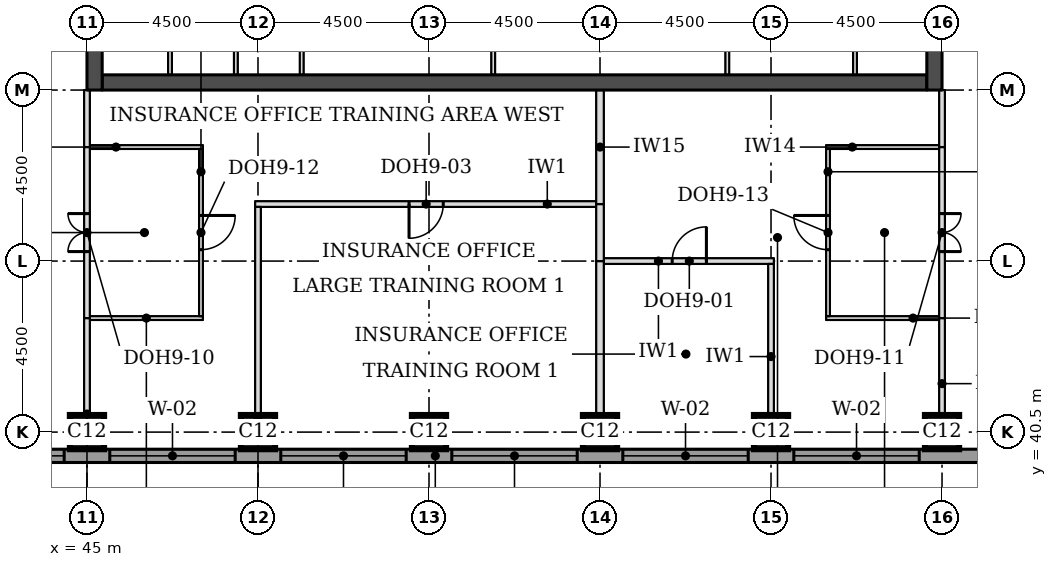
"""IFC4 building model, lengths in metres.
Left out: names, types, materials, properties, quantities, classifications, styles, units other than length and angle.
Written with IfcOpenShell. Run it as: python <this file> out.ifc"""

import sys

from ifc_helpers import new_model, si_unit, direction, frame, frame_2d, origin, origin_2d, place, context, subcontext, project, spatial, rectangle, extrude, element, fill, save


model = new_model("IFC4")
c1 = context("Model", 3, precision=1e-05, world=origin(), true_north=direction((0.0, 1.0)))
c2 = subcontext(c1, "Body", "Model", "MODEL_VIEW")
j1 = project(units=[si_unit("LENGTHUNIT", "METRE"), si_unit("PLANEANGLEUNIT", "RADIAN")], contexts=[c1])
p1 = place(None, origin())
s1 = spatial("IfcSite", under=j1, at=p1, CompositionType="ELEMENT")
p2 = place(p1, origin())
s2 = spatial("IfcBuilding", under=s1, at=p2, CompositionType="ELEMENT")
p3 = place(p2, frame((0.0, 0.0, 219.3)))
s3 = spatial("IfcBuildingStorey", under=s2, at=p3, CompositionType="ELEMENT", Elevation=219.3)
for number, where, z_axis, x_axis in (
    (1, (45.0, 40.5, 0.0), (0.0, 0.0, 1.0), (1.0, 0.0, 0.0)),
    (2, (49.5, 40.5, 0.0), (0.0, 0.0, 1.0), (1.0, 0.0, 0.0)),
    (3, (54.0, 40.5, 0.0), (0.0, 0.0, 1.0), (1.0, 0.0, 0.0)),
    (4, (58.5, 40.5, 0.0), (0.0, 0.0, 1.0), (1.0, 0.0, 0.0)),
    (5, (63.0, 40.5, 0.0), (0.0, 0.0, 1.0), (1.0, 0.0, 0.0)),
    (6, (67.5, 40.5, 0.0), (0.0, 0.0, 1.0), (1.0, 0.0, 0.0)),
):
    element("IfcColumn", number, at=place(p3, frame(where, z_axis=z_axis, x_axis=x_axis)), inside=s3, PredefinedType="COLUMN", context=c2, shape_type="SweptSolid", body=[
        extrude(rectangle(XDim=0.9, YDim=0.9, at=origin_2d()), origin(), (0.0, 0.0, 1.0), 3.7),
    ])
p4 = place(p3, frame((45.4, 49.7, 0.0), z_axis=(0.0, 0.0, 1.0), x_axis=(1.0, 0.0, 0.0)))
e7 = element("IfcWall", 7, at=p4, inside=s3, PredefinedType="SHEAR", context=c2, shape_type="SweptSolid", body=[
    extrude(rectangle(XDim=21.7, YDim=0.4, at=frame_2d((10.85, 0.0))), origin(), (0.0, 0.0, 1.0), 3.7),
])
p5 = place(p3, frame((45.2, 49.5, 0.0), z_axis=(0.0, 0.0, 1.0), x_axis=(0.0, 1.0, 0.0)))
e8 = element("IfcWall", 8, at=p5, inside=s3, PredefinedType="SHEAR", context=c2, shape_type="SweptSolid", body=[
    extrude(rectangle(XDim=22.5, YDim=0.4, at=frame_2d((11.25, 0.0))), origin(), (0.0, 0.0, 1.0), 3.7),
])
p6 = place(p5, frame((4.2, 0.0, 0.0)))
e9 = element("IfcOpeningElement", 9, at=p6, cuts=e8, PredefinedType="OPENING", context=c2, shape_type="SweptSolid", body=[
    extrude(rectangle(XDim=1.8, YDim=2.1, at=frame_2d((0.9, 1.05))), frame((0.0, 0.21, 0.0), z_axis=(0.0, -1.0, 0.0), x_axis=(1.0, 0.0, 0.0)), (0.0, 0.0, 1.0), 0.42),
])
p7 = place(p5, frame((6.9, 0.0, 0.0)))
e10 = element("IfcOpeningElement", 10, at=p7, cuts=e8, PredefinedType="OPENING", context=c2, shape_type="SweptSolid", body=[
    extrude(rectangle(XDim=1.1, YDim=2.1, at=frame_2d((0.55, 1.05))), frame((0.0, 0.21, 0.0), z_axis=(0.0, -1.0, 0.0), x_axis=(1.0, 0.0, 0.0)), (0.0, 0.0, 1.0), 0.42),
])
p8 = place(p5, frame((13.6, 0.0, 0.0)))
e11 = element("IfcOpeningElement", 11, at=p8, cuts=e8, PredefinedType="OPENING", context=c2, shape_type="SweptSolid", body=[
    extrude(rectangle(XDim=1.1, YDim=2.1, at=frame_2d((0.55, 1.05))), frame((0.0, 0.21, 0.0), z_axis=(0.0, -1.0, 0.0), x_axis=(1.0, 0.0, 0.0)), (0.0, 0.0, 1.0), 0.42),
])
p9 = place(p5, frame((16.5, 0.0, 0.0)))
e12 = element("IfcOpeningElement", 12, at=p9, cuts=e8, PredefinedType="OPENING", context=c2, shape_type="SweptSolid", body=[
    extrude(rectangle(XDim=1.8, YDim=2.1, at=frame_2d((0.9, 1.05))), frame((0.0, 0.21, 0.0), z_axis=(0.0, -1.0, 0.0), x_axis=(1.0, 0.0, 0.0)), (0.0, 0.0, 1.0), 0.42),
])
p10 = place(p3, frame((67.3, 49.5, 0.0), z_axis=(0.0, 0.0, 1.0), x_axis=(0.0, 1.0, 0.0)))
e13 = element("IfcWall", 13, at=p10, inside=s3, PredefinedType="SHEAR", context=c2, shape_type="SweptSolid", body=[
    extrude(rectangle(XDim=22.5, YDim=0.4, at=frame_2d((11.25, 0.0))), origin(), (0.0, 0.0, 1.0), 3.7),
])
p11 = place(p10, frame((4.2, 0.0, 0.0)))
e14 = element("IfcOpeningElement", 14, at=p11, cuts=e13, PredefinedType="OPENING", context=c2, shape_type="SweptSolid", body=[
    extrude(rectangle(XDim=1.8, YDim=2.1, at=frame_2d((0.9, 1.05))), frame((0.0, 0.21, 0.0), z_axis=(0.0, -1.0, 0.0), x_axis=(1.0, 0.0, 0.0)), (0.0, 0.0, 1.0), 0.42),
])
p12 = place(p10, frame((6.9, 0.0, 0.0)))
e15 = element("IfcOpeningElement", 15, at=p12, cuts=e13, PredefinedType="OPENING", context=c2, shape_type="SweptSolid", body=[
    extrude(rectangle(XDim=1.1, YDim=2.1, at=frame_2d((0.55, 1.05))), frame((0.0, 0.21, 0.0), z_axis=(0.0, -1.0, 0.0), x_axis=(1.0, 0.0, 0.0)), (0.0, 0.0, 1.0), 0.42),
])
p13 = place(p10, frame((13.6, 0.0, 0.0)))
e16 = element("IfcOpeningElement", 16, at=p13, cuts=e13, PredefinedType="OPENING", context=c2, shape_type="SweptSolid", body=[
    extrude(rectangle(XDim=1.1, YDim=2.1, at=frame_2d((0.55, 1.05))), frame((0.0, 0.21, 0.0), z_axis=(0.0, -1.0, 0.0), x_axis=(1.0, 0.0, 0.0)), (0.0, 0.0, 1.0), 0.42),
])
p14 = place(p10, frame((16.5, 0.0, 0.0)))
e17 = element("IfcOpeningElement", 17, at=p14, cuts=e13, PredefinedType="OPENING", context=c2, shape_type="SweptSolid", body=[
    extrude(rectangle(XDim=1.8, YDim=2.1, at=frame_2d((0.9, 1.05))), frame((0.0, 0.21, 0.0), z_axis=(0.0, -1.0, 0.0), x_axis=(1.0, 0.0, 0.0)), (0.0, 0.0, 1.0), 0.42),
])
p15 = place(p3, frame((36.0, 39.875, 0.0), z_axis=(0.0, 0.0, 1.0), x_axis=(1.0, 0.0, 0.0)))
e18 = element("IfcWall", 18, at=p15, inside=s3, PredefinedType="STANDARD", context=c2, shape_type="SweptSolid", body=[
    extrude(rectangle(XDim=36.331, YDim=0.35, at=frame_2d((18.166, 0.0))), origin(), (0.0, 0.0, 1.0), 3.525),
])
p16 = place(p15, frame((5.1, 0.0, 0.9)))
e19 = element("IfcOpeningElement", 19, at=p16, cuts=e18, PredefinedType="OPENING", context=c2, shape_type="SweptSolid", body=[
    extrude(rectangle(XDim=3.3, YDim=1.9, at=frame_2d((1.65, 0.95))), frame((0.0, 0.185, 0.0), z_axis=(0.0, -1.0, 0.0), x_axis=(1.0, 0.0, 0.0)), (0.0, 0.0, 1.0), 0.37),
])
p17 = place(p15, frame((9.6, 0.0, 0.9)))
e20 = element("IfcOpeningElement", 20, at=p17, cuts=e18, PredefinedType="OPENING", context=c2, shape_type="SweptSolid", body=[
    extrude(rectangle(XDim=3.3, YDim=1.9, at=frame_2d((1.65, 0.95))), frame((0.0, 0.185, 0.0), z_axis=(0.0, -1.0, 0.0), x_axis=(1.0, 0.0, 0.0)), (0.0, 0.0, 1.0), 0.37),
])
p18 = place(p15, frame((14.1, 0.0, 0.9)))
e21 = element("IfcOpeningElement", 21, at=p18, cuts=e18, PredefinedType="OPENING", context=c2, shape_type="SweptSolid", body=[
    extrude(rectangle(XDim=3.3, YDim=1.9, at=frame_2d((1.65, 0.95))), frame((0.0, 0.185, 0.0), z_axis=(0.0, -1.0, 0.0), x_axis=(1.0, 0.0, 0.0)), (0.0, 0.0, 1.0), 0.37),
])
p19 = place(p15, frame((18.6, 0.0, 0.9)))
e22 = element("IfcOpeningElement", 22, at=p19, cuts=e18, PredefinedType="OPENING", context=c2, shape_type="SweptSolid", body=[
    extrude(rectangle(XDim=3.3, YDim=1.9, at=frame_2d((1.65, 0.95))), frame((0.0, 0.185, 0.0), z_axis=(0.0, -1.0, 0.0), x_axis=(1.0, 0.0, 0.0)), (0.0, 0.0, 1.0), 0.37),
])
p20 = place(p15, frame((23.1, 0.0, 0.9)))
e23 = element("IfcOpeningElement", 23, at=p20, cuts=e18, PredefinedType="OPENING", context=c2, shape_type="SweptSolid", body=[
    extrude(rectangle(XDim=3.3, YDim=1.9, at=frame_2d((1.65, 0.95))), frame((0.0, 0.185, 0.0), z_axis=(0.0, -1.0, 0.0), x_axis=(1.0, 0.0, 0.0)), (0.0, 0.0, 1.0), 0.37),
])
p21 = place(p15, frame((27.6, 0.0, 0.9)))
e24 = element("IfcOpeningElement", 24, at=p21, cuts=e18, PredefinedType="OPENING", context=c2, shape_type="SweptSolid", body=[
    extrude(rectangle(XDim=3.3, YDim=1.9, at=frame_2d((1.65, 0.95))), frame((0.0, 0.185, 0.0), z_axis=(0.0, -1.0, 0.0), x_axis=(1.0, 0.0, 0.0)), (0.0, 0.0, 1.0), 0.37),
])
for number, where, z_axis, x_axis in (
    (25, (45.075, 43.5, 0.0), (0.0, 0.0, 1.0), (1.0, 0.0, 0.0)),
    (26, (64.45, 43.5, 0.0), (0.0, 0.0, 1.0), (1.0, 0.0, 0.0)),
):
    element("IfcWall", number, at=place(p3, frame(where, z_axis=z_axis, x_axis=x_axis)), inside=s3, PredefinedType="PARTITIONING", context=c2, shape_type="SweptSolid", body=[
        extrude(rectangle(XDim=2.975, YDim=0.1, at=frame_2d((1.488, 0.0))), origin(), (0.0, 0.0, 1.0), 3.55),
    ])
p22 = place(p3, frame((58.6, 45.0, 0.0), z_axis=(0.0, 0.0, 1.0), x_axis=(1.0, 0.0, 0.0)))
e27 = element("IfcWall", 27, at=p22, inside=s3, PredefinedType="PARTITIONING", context=c2, shape_type="SweptSolid", body=[
    extrude(rectangle(XDim=4.475, YDim=0.15, at=frame_2d((2.237, 0.0))), origin(), (0.0, 0.0, 1.0), 3.55),
])
p23 = place(p22, frame((1.8, 0.0, 0.0)))
e28 = element("IfcOpeningElement", 28, at=p23, cuts=e27, PredefinedType="OPENING", context=c2, shape_type="SweptSolid", body=[
    extrude(rectangle(XDim=0.9, YDim=2.1, at=frame_2d((0.45, 1.05))), frame((0.0, 0.085, 0.0), z_axis=(0.0, -1.0, 0.0), x_axis=(1.0, 0.0, 0.0)), (0.0, 0.0, 1.0), 0.17),
])
p24 = place(p3, frame((49.425, 46.5, 0.0), z_axis=(0.0, 0.0, 1.0), x_axis=(1.0, 0.0, 0.0)))
e29 = element("IfcWall", 29, at=p24, inside=s3, PredefinedType="PARTITIONING", context=c2, shape_type="SweptSolid", body=[
    extrude(rectangle(XDim=8.975, YDim=0.15, at=frame_2d((4.487, 0.0))), origin(), (0.0, 0.0, 1.0), 3.55),
])
p25 = place(p24, frame((4.05, 0.0, 0.0)))
e30 = element("IfcOpeningElement", 30, at=p25, cuts=e29, PredefinedType="OPENING", context=c2, shape_type="SweptSolid", body=[
    extrude(rectangle(XDim=0.9, YDim=2.1, at=frame_2d((0.45, 1.05))), frame((0.0, 0.085, 0.0), z_axis=(0.0, -1.0, 0.0), x_axis=(1.0, 0.0, 0.0)), (0.0, 0.0, 1.0), 0.17),
])
for number, where, z_axis, x_axis in (
    (31, (45.075, 48.0, 0.0), (0.0, 0.0, 1.0), (1.0, 0.0, 0.0)),
    (32, (64.45, 48.0, 0.0), (0.0, 0.0, 1.0), (1.0, 0.0, 0.0)),
):
    element("IfcWall", number, at=place(p3, frame(where, z_axis=z_axis, x_axis=x_axis)), inside=s3, PredefinedType="PARTITIONING", context=c2, shape_type="SweptSolid", body=[
        extrude(rectangle(XDim=2.975, YDim=0.1, at=frame_2d((1.488, 0.0))), origin(), (0.0, 0.0, 1.0), 3.55),
    ])
p26 = place(p3, frame((45.0, 40.05, 0.0), z_axis=(0.0, 0.0, 1.0), x_axis=(0.0, 1.0, 0.0)))
e33 = element("IfcWall", 33, at=p26, inside=s3, PredefinedType="PARTITIONING", context=c2, shape_type="SweptSolid", body=[
    extrude(rectangle(XDim=3.45, YDim=0.15, at=frame_2d((1.725, 0.0))), origin(), (0.0, 0.0, 1.0), 3.022),
])
p27 = place(p3, frame((49.5, 40.05, 0.0), z_axis=(0.0, 0.0, 1.0), x_axis=(0.0, 1.0, 0.0)))
e34 = element("IfcWall", 34, at=p27, inside=s3, PredefinedType="PARTITIONING", context=c2, shape_type="SweptSolid", body=[
    extrude(rectangle(XDim=6.375, YDim=0.15, at=frame_2d((3.188, 0.0))), origin(), (0.0, 0.0, 1.0), 3.55),
])
p28 = place(p3, frame((58.5, 40.05, 0.0), z_axis=(0.0, 0.0, 1.0), x_axis=(0.0, 1.0, 0.0)))
e35 = element("IfcWall", 35, at=p28, inside=s3, PredefinedType="PARTITIONING", context=c2, shape_type="SweptSolid", body=[
    extrude(rectangle(XDim=4.95, YDim=0.2, at=frame_2d((2.475, 0.0))), origin(), (0.0, 0.0, 1.0), 3.55),
])
p29 = place(p3, frame((63.0, 40.05, 0.0), z_axis=(0.0, 0.0, 1.0), x_axis=(0.0, 1.0, 0.0)))
e36 = element("IfcWall", 36, at=p29, inside=s3, PredefinedType="PARTITIONING", context=c2, shape_type="SweptSolid", body=[
    extrude(rectangle(XDim=4.875, YDim=0.15, at=frame_2d((2.438, 0.0))), origin(), (0.0, 0.0, 1.0), 3.55),
])
p30 = place(p3, frame((67.5, 40.05, 0.0), z_axis=(0.0, 0.0, 1.0), x_axis=(0.0, 1.0, 0.0)))
e37 = element("IfcWall", 37, at=p30, inside=s3, PredefinedType="PARTITIONING", context=c2, shape_type="SweptSolid", body=[
    extrude(rectangle(XDim=3.45, YDim=0.15, at=frame_2d((1.725, 0.0))), origin(), (0.0, 0.0, 1.0), 3.022),
])
p31 = place(p3, frame((45.0, 43.5, 0.0), z_axis=(0.0, 0.0, 1.0), x_axis=(0.0, 1.0, 0.0)))
e38 = element("IfcWall", 38, at=p31, inside=s3, PredefinedType="PARTITIONING", context=c2, shape_type="SweptSolid", body=[
    extrude(rectangle(XDim=4.5, YDim=0.15, at=frame_2d((2.25, 0.0))), origin(), (0.0, 0.0, 1.0), 3.022),
])
p32 = place(p31, frame((1.75, 0.0, 0.0)))
e39 = element("IfcOpeningElement", 39, at=p32, cuts=e38, PredefinedType="OPENING", context=c2, shape_type="SweptSolid", body=[
    extrude(rectangle(XDim=1.0, YDim=2.1, at=frame_2d((0.5, 1.05))), frame((0.0, 0.085, 0.0), z_axis=(0.0, -1.0, 0.0), x_axis=(1.0, 0.0, 0.0)), (0.0, 0.0, 1.0), 0.17),
])
p33 = place(p3, frame((67.5, 43.5, 0.0), z_axis=(0.0, 0.0, 1.0), x_axis=(0.0, 1.0, 0.0)))
e40 = element("IfcWall", 40, at=p33, inside=s3, PredefinedType="PARTITIONING", context=c2, shape_type="SweptSolid", body=[
    extrude(rectangle(XDim=4.5, YDim=0.15, at=frame_2d((2.25, 0.0))), origin(), (0.0, 0.0, 1.0), 3.022),
])
p34 = place(p33, frame((1.75, 0.0, 0.0)))
e41 = element("IfcOpeningElement", 41, at=p34, cuts=e40, PredefinedType="OPENING", context=c2, shape_type="SweptSolid", body=[
    extrude(rectangle(XDim=1.0, YDim=2.1, at=frame_2d((0.5, 1.05))), frame((0.0, 0.085, 0.0), z_axis=(0.0, -1.0, 0.0), x_axis=(1.0, 0.0, 0.0)), (0.0, 0.0, 1.0), 0.17),
])
p35 = place(p3, frame((48.0, 43.55, 0.0), z_axis=(0.0, 0.0, 1.0), x_axis=(0.0, 1.0, 0.0)))
e42 = element("IfcWall", 42, at=p35, inside=s3, PredefinedType="PARTITIONING", context=c2, shape_type="SweptSolid", body=[
    extrude(rectangle(XDim=4.4, YDim=0.1, at=frame_2d((2.2, 0.0))), origin(), (0.0, 0.0, 1.0), 3.55),
])
p36 = place(p35, frame((1.75, 0.0, 0.0)))
e43 = element("IfcOpeningElement", 43, at=p36, cuts=e42, PredefinedType="OPENING", context=c2, shape_type="SweptSolid", body=[
    extrude(rectangle(XDim=0.9, YDim=2.1, at=frame_2d((0.45, 1.05))), frame((0.0, 0.06, 0.0), z_axis=(0.0, -1.0, 0.0), x_axis=(1.0, 0.0, 0.0)), (0.0, 0.0, 1.0), 0.12),
])
p37 = place(p3, frame((64.5, 43.55, 0.0), z_axis=(0.0, 0.0, 1.0), x_axis=(0.0, 1.0, 0.0)))
e44 = element("IfcWall", 44, at=p37, inside=s3, PredefinedType="PARTITIONING", context=c2, shape_type="SweptSolid", body=[
    extrude(rectangle(XDim=4.4, YDim=0.1, at=frame_2d((2.2, 0.0))), origin(), (0.0, 0.0, 1.0), 3.55),
])
p38 = place(p37, frame((1.75, 0.0, 0.0)))
e45 = element("IfcOpeningElement", 45, at=p38, cuts=e44, PredefinedType="OPENING", context=c2, shape_type="SweptSolid", body=[
    extrude(rectangle(XDim=0.9, YDim=2.1, at=frame_2d((0.45, 1.05))), frame((0.0, 0.06, 0.0), z_axis=(0.0, -1.0, 0.0), x_axis=(1.0, 0.0, 0.0)), (0.0, 0.0, 1.0), 0.12),
])
p39 = place(p3, frame((58.5, 45.0, 0.0), z_axis=(0.0, 0.0, 1.0), x_axis=(0.0, 1.0, 0.0)))
e46 = element("IfcWall", 46, at=p39, inside=s3, PredefinedType="PARTITIONING", context=c2, shape_type="SweptSolid", body=[
    extrude(rectangle(XDim=1.5, YDim=0.2, at=frame_2d((0.75, 0.0))), origin(), (0.0, 0.0, 1.0), 3.55),
])
p40 = place(p3, frame((58.5, 46.5, 0.0), z_axis=(0.0, 0.0, 1.0), x_axis=(0.0, 1.0, 0.0)))
e47 = element("IfcWall", 47, at=p40, inside=s3, PredefinedType="PARTITIONING", context=c2, shape_type="SweptSolid", body=[
    extrude(rectangle(XDim=3.0, YDim=0.2, at=frame_2d((1.5, 0.0))), origin(), (0.0, 0.0, 1.0), 3.55),
])
for number, where, z_axis, x_axis in (
    (48, (45.0, 48.0, 0.0), (0.0, 0.0, 1.0), (0.0, 1.0, 0.0)),
    (49, (67.5, 48.0, 0.0), (0.0, 0.0, 1.0), (0.0, 1.0, 0.0)),
):
    element("IfcWall", number, at=place(p3, frame(where, z_axis=z_axis, x_axis=x_axis)), inside=s3, PredefinedType="PARTITIONING", context=c2, shape_type="SweptSolid", body=[
        extrude(rectangle(XDim=1.5, YDim=0.15, at=frame_2d((0.75, 0.0))), origin(), (0.0, 0.0, 1.0), 3.022),
    ])
for number, where, z_axis, x_axis in (
    (50, (47.185, 49.9, 0.0), (0.0, 0.0, 1.0), (0.0, 1.0, 0.0)),
    (51, (48.917, 49.9, 0.0), (0.0, 0.0, 1.0), (0.0, 1.0, 0.0)),
    (52, (50.65, 49.9, 0.0), (0.0, 0.0, 1.0), (0.0, 1.0, 0.0)),
    (53, (55.69, 49.9, 0.0), (0.0, 0.0, 1.0), (0.0, 1.0, 0.0)),
    (54, (61.85, 49.9, 0.0), (0.0, 0.0, 1.0), (0.0, 1.0, 0.0)),
    (55, (65.21, 49.9, 0.0), (0.0, 0.0, 1.0), (0.0, 1.0, 0.0)),
):
    element("IfcWall", number, at=place(p3, frame(where, z_axis=z_axis, x_axis=x_axis)), inside=s3, PredefinedType="PARTITIONING", context=c2, shape_type="SweptSolid", body=[
        extrude(rectangle(XDim=3.1, YDim=0.1, at=frame_2d((1.55, 0.0))), origin(), (0.0, 0.0, 1.0), 3.55),
    ])
p41 = place(p16, origin())
e56 = element("IfcWindow", 56, at=p41, inside=s3, PartitioningType="SINGLE_PANEL", PredefinedType="WINDOW", context=c2, shape_type="SweptSolid", body=[
    extrude(rectangle(XDim=3.3, YDim=1.9, at=frame_2d((1.65, 0.95))), frame((0.0, 0.085, 0.0), z_axis=(0.0, -1.0, 0.0), x_axis=(1.0, 0.0, 0.0)), (0.0, 0.0, 1.0), 0.06),
])
fill(e19, e56)
p42 = place(p17, origin())
e57 = element("IfcWindow", 57, at=p42, inside=s3, PartitioningType="SINGLE_PANEL", PredefinedType="WINDOW", context=c2, shape_type="SweptSolid", body=[
    extrude(rectangle(XDim=3.3, YDim=1.9, at=frame_2d((1.65, 0.95))), frame((0.0, 0.085, 0.0), z_axis=(0.0, -1.0, 0.0), x_axis=(1.0, 0.0, 0.0)), (0.0, 0.0, 1.0), 0.06),
])
fill(e20, e57)
p43 = place(p18, origin())
e58 = element("IfcWindow", 58, at=p43, inside=s3, PartitioningType="SINGLE_PANEL", PredefinedType="WINDOW", context=c2, shape_type="SweptSolid", body=[
    extrude(rectangle(XDim=3.3, YDim=1.9, at=frame_2d((1.65, 0.95))), frame((0.0, 0.085, 0.0), z_axis=(0.0, -1.0, 0.0), x_axis=(1.0, 0.0, 0.0)), (0.0, 0.0, 1.0), 0.06),
])
fill(e21, e58)
p44 = place(p19, origin())
e59 = element("IfcWindow", 59, at=p44, inside=s3, PartitioningType="SINGLE_PANEL", PredefinedType="WINDOW", context=c2, shape_type="SweptSolid", body=[
    extrude(rectangle(XDim=3.3, YDim=1.9, at=frame_2d((1.65, 0.95))), frame((0.0, 0.085, 0.0), z_axis=(0.0, -1.0, 0.0), x_axis=(1.0, 0.0, 0.0)), (0.0, 0.0, 1.0), 0.06),
])
fill(e22, e59)
p45 = place(p20, origin())
e60 = element("IfcWindow", 60, at=p45, inside=s3, PartitioningType="SINGLE_PANEL", PredefinedType="WINDOW", context=c2, shape_type="SweptSolid", body=[
    extrude(rectangle(XDim=3.3, YDim=1.9, at=frame_2d((1.65, 0.95))), frame((0.0, 0.085, 0.0), z_axis=(0.0, -1.0, 0.0), x_axis=(1.0, 0.0, 0.0)), (0.0, 0.0, 1.0), 0.06),
])
fill(e23, e60)
p46 = place(p21, origin())
e61 = element("IfcWindow", 61, at=p46, inside=s3, PartitioningType="SINGLE_PANEL", PredefinedType="WINDOW", context=c2, shape_type="SweptSolid", body=[
    extrude(rectangle(XDim=3.3, YDim=1.9, at=frame_2d((1.65, 0.95))), frame((0.0, 0.085, 0.0), z_axis=(0.0, -1.0, 0.0), x_axis=(1.0, 0.0, 0.0)), (0.0, 0.0, 1.0), 0.06),
])
fill(e24, e61)
p47 = place(p32, origin())
e62 = element("IfcDoor", 62, at=p47, inside=s3, OperationType="DOUBLE_DOOR_SINGLE_SWING", PredefinedType="DOOR", context=c2, shape_type="SweptSolid", body=[
    extrude(rectangle(XDim=1.0, YDim=2.1, at=frame_2d((0.5, 1.05))), frame((0.0, 0.025, 0.0), z_axis=(0.0, -1.0, 0.0), x_axis=(1.0, 0.0, 0.0)), (0.0, 0.0, 1.0), 0.05),
])
fill(e39, e62)
p48 = place(p36, frame((0.9, 0.0, 0.0), z_axis=(0.0, 0.0, 1.0), x_axis=(-1.0, 0.0, 0.0)))
e63 = element("IfcDoor", 63, at=p48, inside=s3, OperationType="SINGLE_SWING_LEFT", PredefinedType="DOOR", context=c2, shape_type="SweptSolid", body=[
    extrude(rectangle(XDim=0.9, YDim=2.1, at=frame_2d((0.45, 1.05))), frame((0.0, 0.025, 0.0), z_axis=(0.0, -1.0, 0.0), x_axis=(1.0, 0.0, 0.0)), (0.0, 0.0, 1.0), 0.05),
])
fill(e43, e63)
p49 = place(p25, frame((0.9, 0.0, 0.0), z_axis=(0.0, 0.0, 1.0), x_axis=(-1.0, 0.0, 0.0)))
e64 = element("IfcDoor", 64, at=p49, inside=s3, OperationType="SINGLE_SWING_RIGHT", PredefinedType="DOOR", context=c2, shape_type="SweptSolid", body=[
    extrude(rectangle(XDim=0.9, YDim=2.1, at=frame_2d((0.45, 1.05))), frame((0.0, 0.025, 0.0), z_axis=(0.0, -1.0, 0.0), x_axis=(1.0, 0.0, 0.0)), (0.0, 0.0, 1.0), 0.05),
])
fill(e30, e64)
p50 = place(p34, frame((1.0, 0.0, 0.0), z_axis=(0.0, 0.0, 1.0), x_axis=(-1.0, 0.0, 0.0)))
e65 = element("IfcDoor", 65, at=p50, inside=s3, OperationType="DOUBLE_DOOR_SINGLE_SWING", PredefinedType="DOOR", context=c2, shape_type="SweptSolid", body=[
    extrude(rectangle(XDim=1.0, YDim=2.1, at=frame_2d((0.5, 1.05))), frame((0.0, 0.025, 0.0), z_axis=(0.0, -1.0, 0.0), x_axis=(1.0, 0.0, 0.0)), (0.0, 0.0, 1.0), 0.05),
])
fill(e41, e65)
p51 = place(p38, origin())
e66 = element("IfcDoor", 66, at=p51, inside=s3, OperationType="SINGLE_SWING_RIGHT", PredefinedType="DOOR", context=c2, shape_type="SweptSolid", body=[
    extrude(rectangle(XDim=0.9, YDim=2.1, at=frame_2d((0.45, 1.05))), frame((0.0, 0.025, 0.0), z_axis=(0.0, -1.0, 0.0), x_axis=(1.0, 0.0, 0.0)), (0.0, 0.0, 1.0), 0.05),
])
fill(e45, e66)
p52 = place(p23, origin())
e67 = element("IfcDoor", 67, at=p52, inside=s3, OperationType="SINGLE_SWING_RIGHT", PredefinedType="DOOR", context=c2, shape_type="SweptSolid", body=[
    extrude(rectangle(XDim=0.9, YDim=2.1, at=frame_2d((0.45, 1.05))), frame((0.0, 0.025, 0.0), z_axis=(0.0, -1.0, 0.0), x_axis=(1.0, 0.0, 0.0)), (0.0, 0.0, 1.0), 0.05),
])
fill(e28, e67)
save(model, sys.argv[1])
